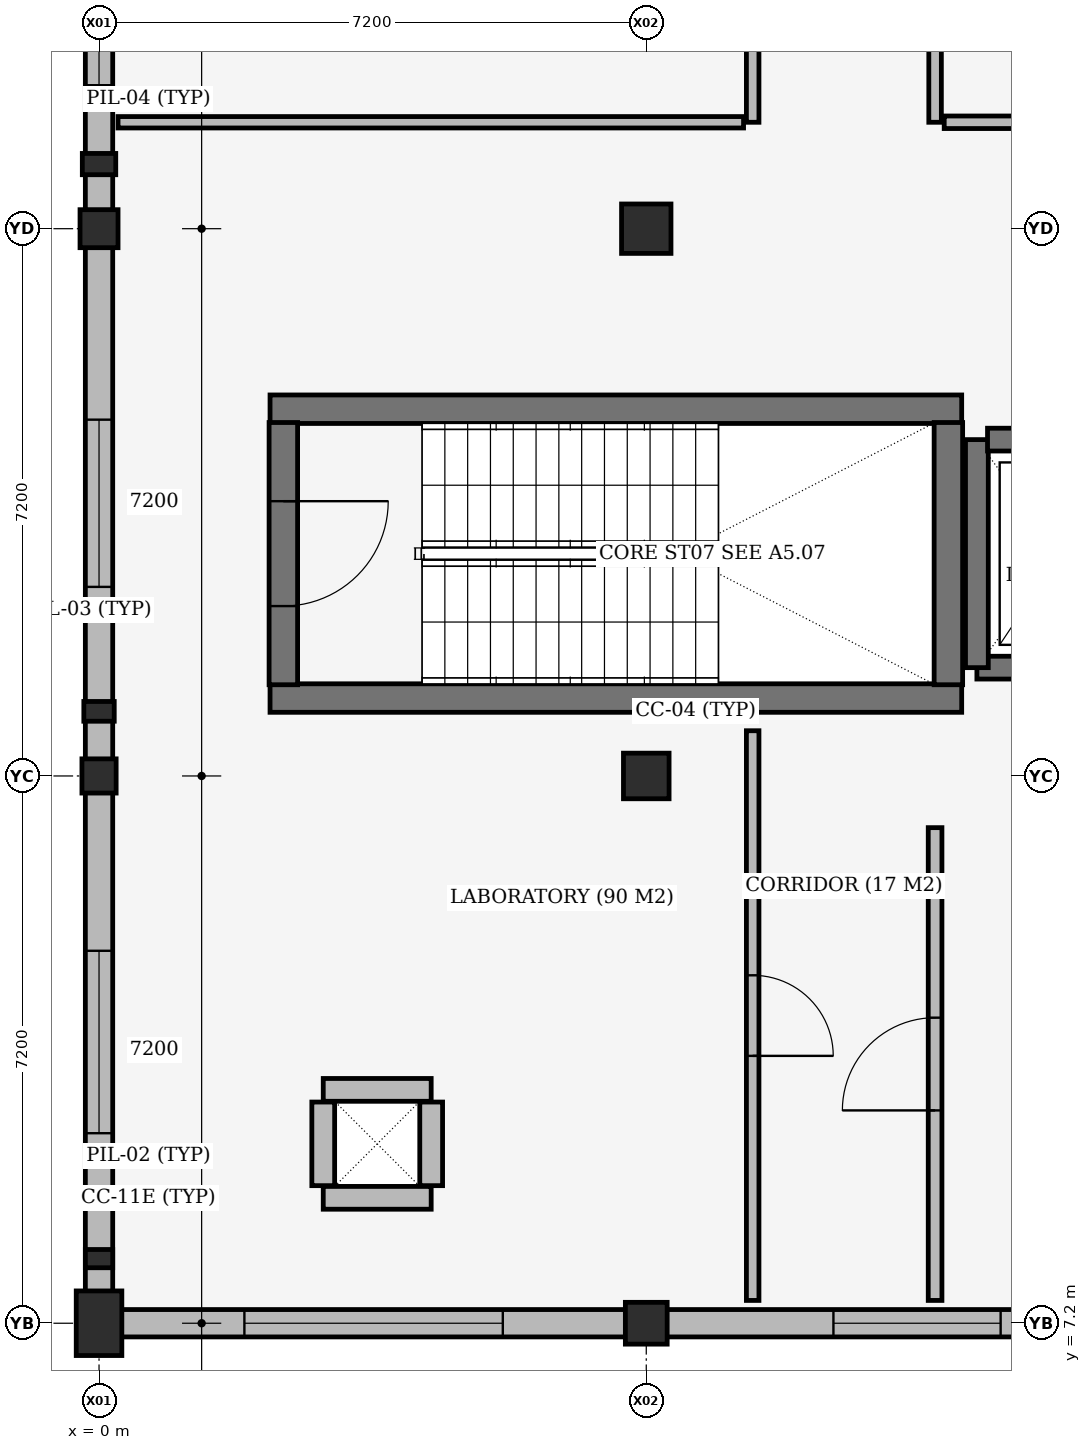
"""IFC4 building model, lengths in metres.
Left out: names, types, materials, properties, quantities, classifications, styles, units other than length and angle.
Written with IfcOpenShell. Run it as: python <this file> out.ifc"""

import sys

from ifc_helpers import new_model, si_unit, direction, frame, frame_2d, origin, origin_2d, place, context, subcontext, project, spatial, rectangle, extrude, element, fill, save


model = new_model("IFC4")
c1 = context("Model", 3, precision=1e-05, world=origin(), true_north=direction((0.0, 1.0)))
c2 = subcontext(c1, "Body", "Model", "MODEL_VIEW")
j1 = project(units=[si_unit("LENGTHUNIT", "METRE"), si_unit("PLANEANGLEUNIT", "RADIAN")], contexts=[c1])
p1 = place(None, origin())
s1 = spatial("IfcSite", under=j1, at=p1, CompositionType="ELEMENT")
p2 = place(p1, origin())
s2 = spatial("IfcBuilding", under=s1, at=p2, CompositionType="ELEMENT")
p3 = place(p2, frame((0.0, 0.0, 5.4)))
s3 = spatial("IfcBuildingStorey", under=s2, at=p3, CompositionType="ELEMENT", Elevation=5.4)
p4 = place(p3, frame((2.95, 8.85, 0.0), z_axis=(0.0, 0.0, 1.0), x_axis=(1.0, 0.0, 0.0)))
e1 = element("IfcWall", 1, at=p4, inside=s3, PredefinedType="SHEAR", context=c2, shape_type="SweptSolid", body=[
    extrude(rectangle(XDim=1.42, YDim=0.3, at=frame_2d((0.71, 0.0))), origin(), (0.0, 0.0, 1.0), 3.96),
])
p5 = place(p3, frame((4.37, 9.01, 0.0), z_axis=(0.0, 0.0, 1.0), x_axis=(0.0, 1.0, 0.0)))
e2 = element("IfcWall", 2, at=p5, inside=s3, PredefinedType="SHEAR", context=c2, shape_type="SweptSolid", body=[
    extrude(rectangle(XDim=1.1, YDim=0.3, at=frame_2d((0.55, 0.0))), origin(), (0.0, 0.0, 1.0), 3.96),
])
p6 = place(p3, frame((4.37, 10.27, 0.0), z_axis=(0.0, 0.0, 1.0), x_axis=(-1.0, 0.0, 0.0)))
e3 = element("IfcWall", 3, at=p6, inside=s3, PredefinedType="SHEAR", context=c2, shape_type="SweptSolid", body=[
    extrude(rectangle(XDim=1.42, YDim=0.3, at=frame_2d((0.71, 0.0))), origin(), (0.0, 0.0, 1.0), 3.96),
])
p7 = place(p3, frame((2.95, 10.11, 0.0), z_axis=(0.0, 0.0, 1.0), x_axis=(0.0, -1.0, 0.0)))
e4 = element("IfcWall", 4, at=p7, inside=s3, PredefinedType="SHEAR", context=c2, shape_type="SweptSolid", body=[
    extrude(rectangle(XDim=1.1, YDim=0.3, at=frame_2d((0.55, 0.0))), origin(), (0.0, 0.0, 1.0), 3.96),
])
p8 = place(p3, frame((0.0, 7.2, 0.0), z_axis=(0.0, 0.0, 1.0), x_axis=(1.0, 0.0, 0.0)))
e5 = element("IfcColumn", 5, at=p8, inside=s3, PredefinedType="COLUMN", context=c2, shape_type="SweptSolid", body=[
    extrude(rectangle(XDim=0.6, YDim=0.85, at=origin_2d()), origin(), (0.0, 0.0, 1.0), 3.89),
])
p9 = place(p3, frame((0.0, 14.4, 0.0), z_axis=(0.0, 0.0, 1.0), x_axis=(1.0, 0.0, 0.0)))
e6 = element("IfcColumn", 6, at=p9, inside=s3, PredefinedType="COLUMN", context=c2, shape_type="SweptSolid", body=[
    extrude(rectangle(XDim=0.45, YDim=0.45, at=origin_2d()), origin(), (0.0, 0.0, 1.0), 3.89),
])
p10 = place(p3, frame((0.0, 21.6, 0.0), z_axis=(0.0, 0.0, 1.0), x_axis=(1.0, 0.0, 0.0)))
e7 = element("IfcColumn", 7, at=p10, inside=s3, PredefinedType="COLUMN", context=c2, shape_type="SweptSolid", body=[
    extrude(rectangle(XDim=0.5, YDim=0.5, at=origin_2d()), origin(), (0.0, 0.0, 1.0), 3.89),
])
p11 = place(p3, frame((7.2, 7.2, 0.0), z_axis=(0.0, 0.0, 1.0), x_axis=(1.0, 0.0, 0.0)))
e8 = element("IfcColumn", 8, at=p11, inside=s3, PredefinedType="COLUMN", context=c2, shape_type="SweptSolid", body=[
    extrude(rectangle(XDim=0.55, YDim=0.55, at=origin_2d()), origin(), (0.0, 0.0, 1.0), 3.89),
])
p12 = place(p3, frame((7.2, 14.4, 0.0), z_axis=(0.0, 0.0, 1.0), x_axis=(1.0, 0.0, 0.0)))
e9 = element("IfcColumn", 9, at=p12, inside=s3, PredefinedType="COLUMN", context=c2, shape_type="SweptSolid", body=[
    extrude(rectangle(XDim=0.6, YDim=0.6, at=origin_2d()), origin(), (0.0, 0.0, 1.0), 3.89),
])
p13 = place(p3, frame((7.2, 21.6, 0.0), z_axis=(0.0, 0.0, 1.0), x_axis=(1.0, 0.0, 0.0)))
e10 = element("IfcColumn", 10, at=p13, inside=s3, PredefinedType="COLUMN", context=c2, shape_type="SweptSolid", body=[
    extrude(rectangle(XDim=0.65, YDim=0.65, at=origin_2d()), origin(), (0.0, 0.0, 1.0), 3.89),
])
p14 = place(p3, frame((0.0, 8.05, 0.0), z_axis=(0.0, 0.0, 1.0), x_axis=(1.0, 0.0, 0.0)))
e11 = element("IfcColumn", 11, at=p14, inside=s3, PredefinedType="PILASTER", context=c2, shape_type="SweptSolid", body=[
    extrude(rectangle(XDim=0.36, YDim=0.24, at=origin_2d()), origin(), (0.0, 0.0, 1.0), 3.89),
])
p15 = place(p3, frame((0.0, 15.25, 0.0), z_axis=(0.0, 0.0, 1.0), x_axis=(1.0, 0.0, 0.0)))
e12 = element("IfcColumn", 12, at=p15, inside=s3, PredefinedType="PILASTER", context=c2, shape_type="SweptSolid", body=[
    extrude(rectangle(XDim=0.4, YDim=0.26, at=origin_2d()), origin(), (0.0, 0.0, 1.0), 3.89),
])
p16 = place(p3, frame((0.0, 22.45, 0.0), z_axis=(0.0, 0.0, 1.0), x_axis=(1.0, 0.0, 0.0)))
e13 = element("IfcColumn", 13, at=p16, inside=s3, PredefinedType="PILASTER", context=c2, shape_type="SweptSolid", body=[
    extrude(rectangle(XDim=0.44, YDim=0.28, at=origin_2d()), origin(), (0.0, 0.0, 1.0), 3.89),
])
for number, where, z_axis, x_axis in (
    (14, (2.25, 15.425, 0.0), (0.0, 0.0, 1.0), (1.0, 0.0, 0.0)),
    (15, (11.35, 19.225, 0.0), (0.0, 0.0, 1.0), (-1.0, 0.0, 0.0)),
):
    element("IfcWall", number, at=place(p3, frame(where, z_axis=z_axis, x_axis=x_axis)), inside=s3, PredefinedType="SHEAR", context=c2, shape_type="SweptSolid", body=[
        extrude(rectangle(XDim=9.1, YDim=0.375, at=frame_2d((4.55, 0.0))), origin(), (0.0, 0.0, 1.0), 3.89),
    ])
p17 = place(p3, frame((11.175, 15.6, 0.0), z_axis=(0.0, 0.0, 1.0), x_axis=(0.0, 1.0, 0.0)))
e16 = element("IfcWall", 16, at=p17, inside=s3, PredefinedType="SHEAR", context=c2, shape_type="SweptSolid", body=[
    extrude(rectangle(XDim=3.45, YDim=0.375, at=frame_2d((1.725, 0.0))), origin(), (0.0, 0.0, 1.0), 3.89),
])
p18 = place(p3, frame((11.55, 15.825, 0.0), z_axis=(0.0, 0.0, 1.0), x_axis=(1.0, 0.0, 0.0)))
e17 = element("IfcWall", 17, at=p18, inside=s3, PredefinedType="SHEAR", context=c2, shape_type="SweptSolid", body=[
    extrude(rectangle(XDim=2.2, YDim=0.3, at=frame_2d((1.1, 0.0))), origin(), (0.0, 0.0, 1.0), 3.89),
])
p19 = place(p3, frame((11.55, 18.825, 0.0), z_axis=(0.0, 0.0, 1.0), x_axis=(0.0, -1.0, 0.0)))
e18 = element("IfcWall", 18, at=p19, inside=s3, PredefinedType="SHEAR", context=c2, shape_type="SweptSolid", body=[
    extrude(rectangle(XDim=3.0, YDim=0.3, at=frame_2d((1.5, 0.0))), origin(), (0.0, 0.0, 1.0), 3.89),
])
p20 = place(p3, frame((6.933, 7.2, 0.0), z_axis=(0.0, 0.0, 1.0), x_axis=(-1.0, 0.0, 0.0)))
e19 = element("IfcWall", 19, at=p20, inside=s3, PredefinedType="STANDARD", context=c2, shape_type="SweptSolid", body=[
    extrude(rectangle(XDim=6.641, YDim=0.36, at=frame_2d((3.321, 0.0))), origin(), (0.0, 0.0, 1.0), 3.15),
])
p21 = place(p20, frame((1.621, 0.0, 0.9)))
e20 = element("IfcOpeningElement", 20, at=p21, cuts=e19, PredefinedType="OPENING", context=c2, shape_type="SweptSolid", body=[
    extrude(rectangle(XDim=3.4, YDim=1.5, at=frame_2d((1.7, 0.75))), frame((0.0, 0.19, 0.0), z_axis=(0.0, -1.0, 0.0), x_axis=(1.0, 0.0, 0.0)), (0.0, 0.0, 1.0), 0.38),
])
p22 = place(p3, frame((14.058, 7.2, 0.0), z_axis=(0.0, 0.0, 1.0), x_axis=(-1.0, 0.0, 0.0)))
e21 = element("IfcWall", 21, at=p22, inside=s3, PredefinedType="STANDARD", context=c2, shape_type="SweptSolid", body=[
    extrude(rectangle(XDim=6.591, YDim=0.36, at=frame_2d((3.295, 0.0))), origin(), (0.0, 0.0, 1.0), 3.37),
])
p23 = place(p22, frame((2.196, 0.0, 0.9)))
e22 = element("IfcOpeningElement", 22, at=p23, cuts=e21, PredefinedType="OPENING", context=c2, shape_type="SweptSolid", body=[
    extrude(rectangle(XDim=2.2, YDim=2.2, at=frame_2d((1.1, 1.1))), frame((0.0, 0.19, 0.0), z_axis=(0.0, -1.0, 0.0), x_axis=(1.0, 0.0, 0.0)), (0.0, 0.0, 1.0), 0.38),
])
p24 = place(p3, frame((0.0, 7.617, 0.0), z_axis=(0.0, 0.0, 1.0), x_axis=(0.0, 1.0, 0.0)))
e23 = element("IfcWall", 23, at=p24, inside=s3, PredefinedType="STANDARD", context=c2, shape_type="SweptSolid", body=[
    extrude(rectangle(XDim=6.566, YDim=0.36, at=frame_2d((3.283, 0.0))), origin(), (0.0, 0.0, 1.0), 3.31),
])
p25 = place(p24, frame((2.083, 0.0, 0.9)))
e24 = element("IfcOpeningElement", 24, at=p25, cuts=e23, PredefinedType="OPENING", context=c2, shape_type="SweptSolid", body=[
    extrude(rectangle(XDim=2.4, YDim=2.2, at=frame_2d((1.2, 1.1))), frame((0.0, 0.19, 0.0), z_axis=(0.0, -1.0, 0.0), x_axis=(1.0, 0.0, 0.0)), (0.0, 0.0, 1.0), 0.38),
])
p26 = place(p3, frame((0.0, 14.617, 0.0), z_axis=(0.0, 0.0, 1.0), x_axis=(0.0, 1.0, 0.0)))
e25 = element("IfcWall", 25, at=p26, inside=s3, PredefinedType="STANDARD", context=c2, shape_type="SweptSolid", body=[
    extrude(rectangle(XDim=6.741, YDim=0.36, at=frame_2d((3.371, 0.0))), origin(), (0.0, 0.0, 1.0), 3.25),
])
p27 = place(p26, frame((2.271, 0.0, 0.9)))
e26 = element("IfcOpeningElement", 26, at=p27, cuts=e25, PredefinedType="OPENING", context=c2, shape_type="SweptSolid", body=[
    extrude(rectangle(XDim=2.2, YDim=2.2, at=frame_2d((1.1, 1.1))), frame((0.0, 0.19, 0.0), z_axis=(0.0, -1.0, 0.0), x_axis=(1.0, 0.0, 0.0)), (0.0, 0.0, 1.0), 0.38),
])
p28 = place(p3, frame((0.0, 21.842, 0.0), z_axis=(0.0, 0.0, 1.0), x_axis=(0.0, 1.0, 0.0)))
e27 = element("IfcWall", 27, at=p28, inside=s3, PredefinedType="STANDARD", context=c2, shape_type="SweptSolid", body=[
    extrude(rectangle(XDim=6.691, YDim=0.36, at=frame_2d((3.345, 0.0))), origin(), (0.0, 0.0, 1.0), 3.21),
])
p29 = place(p28, frame((1.646, 0.0, 0.9)))
e28 = element("IfcOpeningElement", 28, at=p29, cuts=e27, PredefinedType="OPENING", context=c2, shape_type="SweptSolid", body=[
    extrude(rectangle(XDim=3.4, YDim=1.5, at=frame_2d((1.7, 0.75))), frame((0.0, 0.19, 0.0), z_axis=(0.0, -1.0, 0.0), x_axis=(1.0, 0.0, 0.0)), (0.0, 0.0, 1.0), 0.38),
])
p30 = place(p3, frame((2.425, 19.05, 0.0), z_axis=(0.0, 0.0, 1.0), x_axis=(0.0, -1.0, 0.0)))
e29 = element("IfcWall", 29, at=p30, inside=s3, PredefinedType="SHEAR", context=c2, shape_type="SweptSolid", body=[
    extrude(rectangle(XDim=3.45, YDim=0.375, at=frame_2d((1.725, 0.0))), origin(), (0.0, 0.0, 1.0), 3.89),
])
p31 = place(p30, frame((1.035, 0.0, 0.0)))
e30 = element("IfcOpeningElement", 30, at=p31, cuts=e29, PredefinedType="OPENING", context=c2, shape_type="SweptSolid", body=[
    extrude(rectangle(XDim=1.38, YDim=2.2, at=frame_2d((0.69, 1.1))), frame((0.0, 0.198, 0.0), z_axis=(0.0, -1.0, 0.0), x_axis=(1.0, 0.0, 0.0)), (0.0, 0.0, 1.0), 0.395),
])
p32 = place(p3, frame((11.69, 18.825, 0.0), z_axis=(0.0, 0.0, 1.0), x_axis=(1.0, 0.0, 0.0)))
e31 = element("IfcWall", 31, at=p32, inside=s3, PredefinedType="SHEAR", context=c2, shape_type="SweptSolid", body=[
    extrude(rectangle(XDim=1.92, YDim=0.3, at=frame_2d((0.96, 0.0))), origin(), (0.0, 0.0, 1.0), 3.89),
])
p33 = place(p32, frame((0.36, 0.0, 0.0)))
e32 = element("IfcOpeningElement", 32, at=p33, cuts=e31, PredefinedType="OPENING", context=c2, shape_type="SweptSolid", body=[
    extrude(rectangle(XDim=1.2, YDim=2.1, at=frame_2d((0.6, 1.05))), frame((0.0, 0.16, 0.0), z_axis=(0.0, -1.0, 0.0), x_axis=(1.0, 0.0, 0.0)), (0.0, 0.0, 1.0), 0.32),
])
p34 = place(p3, frame((8.6, 7.5, 0.0), z_axis=(0.0, 0.0, 1.0), x_axis=(0.0, 1.0, 0.0)))
e33 = element("IfcWall", 33, at=p34, inside=s3, PredefinedType="PARTITIONING", context=c2, shape_type="SweptSolid", body=[
    extrude(rectangle(XDim=7.495, YDim=0.165, at=frame_2d((3.748, 0.0))), origin(), (0.0, 0.0, 1.0), 3.31),
])
p35 = place(p34, frame((3.218, 0.0, 0.0)))
e34 = element("IfcOpeningElement", 34, at=p35, cuts=e33, PredefinedType="OPENING", context=c2, shape_type="SweptSolid", body=[
    extrude(rectangle(XDim=1.06, YDim=2.2, at=frame_2d((0.53, 1.1))), frame((0.0, 0.093, 0.0), z_axis=(0.0, -1.0, 0.0), x_axis=(1.0, 0.0, 0.0)), (0.0, 0.0, 1.0), 0.185),
])
p36 = place(p3, frame((0.25, 23.0, 0.0), z_axis=(0.0, 0.0, 1.0), x_axis=(1.0, 0.0, 0.0)))
e35 = element("IfcWall", 35, at=p36, inside=s3, PredefinedType="PARTITIONING", context=c2, shape_type="SweptSolid", body=[
    extrude(rectangle(XDim=8.23, YDim=0.15, at=frame_2d((4.115, 0.0))), origin(), (0.0, 0.0, 1.0), 3.15),
])
p37 = place(p3, frame((8.6, 23.0, 0.0), z_axis=(0.0, 0.0, 1.0), x_axis=(0.0, 1.0, 0.0)))
e36 = element("IfcWall", 36, at=p37, inside=s3, PredefinedType="PARTITIONING", context=c2, shape_type="SweptSolid", body=[
    extrude(rectangle(XDim=8.595, YDim=0.165, at=frame_2d((4.297, 0.0))), origin(), (0.0, 0.0, 1.0), 3.21),
])
p38 = place(p37, frame((3.772, 0.0, 0.0)))
e37 = element("IfcOpeningElement", 37, at=p38, cuts=e36, PredefinedType="OPENING", context=c2, shape_type="SweptSolid", body=[
    extrude(rectangle(XDim=1.05, YDim=2.2, at=frame_2d((0.525, 1.1))), frame((0.0, 0.093, 0.0), z_axis=(0.0, -1.0, 0.0), x_axis=(1.0, 0.0, 0.0)), (0.0, 0.0, 1.0), 0.185),
])
p39 = place(p3, frame((11.0, 7.5, 0.0), z_axis=(0.0, 0.0, 1.0), x_axis=(0.0, 1.0, 0.0)))
e38 = element("IfcWall", 38, at=p39, inside=s3, PredefinedType="PARTITIONING", context=c2, shape_type="SweptSolid", body=[
    extrude(rectangle(XDim=6.22, YDim=0.18, at=frame_2d((3.11, 0.0))), origin(), (0.0, 0.0, 1.0), 3.89),
])
p40 = place(p39, frame((2.5, 0.0, 0.0)))
e39 = element("IfcOpeningElement", 39, at=p40, cuts=e38, PredefinedType="OPENING", context=c2, shape_type="SweptSolid", body=[
    extrude(rectangle(XDim=1.22, YDim=2.25, at=frame_2d((0.61, 1.125))), frame((0.0, 0.1, 0.0), z_axis=(0.0, -1.0, 0.0), x_axis=(1.0, 0.0, 0.0)), (0.0, 0.0, 1.0), 0.2),
])
p41 = place(p3, frame((11.0, 23.0, 0.0), z_axis=(0.0, 0.0, 1.0), x_axis=(0.0, 1.0, 0.0)))
e40 = element("IfcWall", 40, at=p41, inside=s3, PredefinedType="PARTITIONING", context=c2, shape_type="SweptSolid", body=[
    extrude(rectangle(XDim=10.333, YDim=0.165, at=frame_2d((5.167, 0.0))), origin(), (0.0, 0.0, 1.0), 3.21),
])
p42 = place(p41, frame((4.636, 0.0, 0.0)))
e41 = element("IfcOpeningElement", 41, at=p42, cuts=e40, PredefinedType="OPENING", context=c2, shape_type="SweptSolid", body=[
    extrude(rectangle(XDim=1.06, YDim=2.2, at=frame_2d((0.53, 1.1))), frame((0.0, 0.093, 0.0), z_axis=(0.0, -1.0, 0.0), x_axis=(1.0, 0.0, 0.0)), (0.0, 0.0, 1.0), 0.185),
])
p43 = place(p3, frame((11.12, 23.0, 0.0), z_axis=(0.0, 0.0, 1.0), x_axis=(1.0, 0.0, 0.0)))
e42 = element("IfcWall", 42, at=p43, inside=s3, PredefinedType="PARTITIONING", context=c2, shape_type="SweptSolid", body=[
    extrude(rectangle(XDim=18.96, YDim=0.165, at=frame_2d((9.48, 0.0))), origin(), (0.0, 0.0, 1.0), 3.21),
])
p44 = place(p21, origin())
e43 = element("IfcWindow", 43, at=p44, inside=s3, PartitioningType="DOUBLE_PANEL_VERTICAL", PredefinedType="WINDOW", context=c2, shape_type="SweptSolid", body=[
    extrude(rectangle(XDim=3.4, YDim=1.5, at=frame_2d((1.7, 0.75))), frame((0.0, 0.03, 0.0), z_axis=(0.0, -1.0, 0.0), x_axis=(1.0, 0.0, 0.0)), (0.0, 0.0, 1.0), 0.06),
])
fill(e20, e43)
p45 = place(p23, origin())
e44 = element("IfcWindow", 44, at=p45, inside=s3, PartitioningType="DOUBLE_PANEL_VERTICAL", PredefinedType="WINDOW", context=c2, shape_type="SweptSolid", body=[
    extrude(rectangle(XDim=2.2, YDim=2.2, at=frame_2d((1.1, 1.1))), frame((0.0, 0.03, 0.0), z_axis=(0.0, -1.0, 0.0), x_axis=(1.0, 0.0, 0.0)), (0.0, 0.0, 1.0), 0.06),
])
fill(e22, e44)
p46 = place(p25, origin())
e45 = element("IfcWindow", 45, at=p46, inside=s3, PartitioningType="DOUBLE_PANEL_VERTICAL", PredefinedType="WINDOW", context=c2, shape_type="SweptSolid", body=[
    extrude(rectangle(XDim=2.4, YDim=2.2, at=frame_2d((1.2, 1.1))), frame((0.0, 0.03, 0.0), z_axis=(0.0, -1.0, 0.0), x_axis=(1.0, 0.0, 0.0)), (0.0, 0.0, 1.0), 0.06),
])
fill(e24, e45)
p47 = place(p27, origin())
e46 = element("IfcWindow", 46, at=p47, inside=s3, PartitioningType="DOUBLE_PANEL_VERTICAL", PredefinedType="WINDOW", context=c2, shape_type="SweptSolid", body=[
    extrude(rectangle(XDim=2.2, YDim=2.2, at=frame_2d((1.1, 1.1))), frame((0.0, 0.03, 0.0), z_axis=(0.0, -1.0, 0.0), x_axis=(1.0, 0.0, 0.0)), (0.0, 0.0, 1.0), 0.06),
])
fill(e26, e46)
p48 = place(p29, origin())
e47 = element("IfcWindow", 47, at=p48, inside=s3, PartitioningType="DOUBLE_PANEL_VERTICAL", PredefinedType="WINDOW", context=c2, shape_type="SweptSolid", body=[
    extrude(rectangle(XDim=3.4, YDim=1.5, at=frame_2d((1.7, 0.75))), frame((0.0, 0.03, 0.0), z_axis=(0.0, -1.0, 0.0), x_axis=(1.0, 0.0, 0.0)), (0.0, 0.0, 1.0), 0.06),
])
fill(e28, e47)
p49 = place(p31, origin())
e48 = element("IfcDoor", 48, at=p49, inside=s3, OperationType="DOUBLE_DOOR_SINGLE_SWING", PredefinedType="DOOR", context=c2, shape_type="SweptSolid", body=[
    extrude(rectangle(XDim=1.38, YDim=2.2, at=frame_2d((0.69, 1.1))), frame((0.0, 0.025, 0.0), z_axis=(0.0, -1.0, 0.0), x_axis=(1.0, 0.0, 0.0)), (0.0, 0.0, 1.0), 0.05),
])
fill(e30, e48)
p50 = place(p35, origin())
e49 = element("IfcDoor", 49, at=p50, inside=s3, OperationType="SINGLE_SWING_RIGHT", PredefinedType="DOOR", context=c2, shape_type="SweptSolid", body=[
    extrude(rectangle(XDim=1.06, YDim=2.2, at=frame_2d((0.53, 1.1))), frame((0.0, 0.025, 0.0), z_axis=(0.0, -1.0, 0.0), x_axis=(1.0, 0.0, 0.0)), (0.0, 0.0, 1.0), 0.05),
])
fill(e34, e49)
p51 = place(p40, origin())
e50 = element("IfcDoor", 50, at=p51, inside=s3, OperationType="SINGLE_SWING_LEFT", PredefinedType="DOOR", context=c2, shape_type="SweptSolid", body=[
    extrude(rectangle(XDim=1.22, YDim=2.25, at=frame_2d((0.61, 1.125))), frame((0.0, 0.025, 0.0), z_axis=(0.0, -1.0, 0.0), x_axis=(1.0, 0.0, 0.0)), (0.0, 0.0, 1.0), 0.05),
])
fill(e39, e50)
save(model, sys.argv[1])
